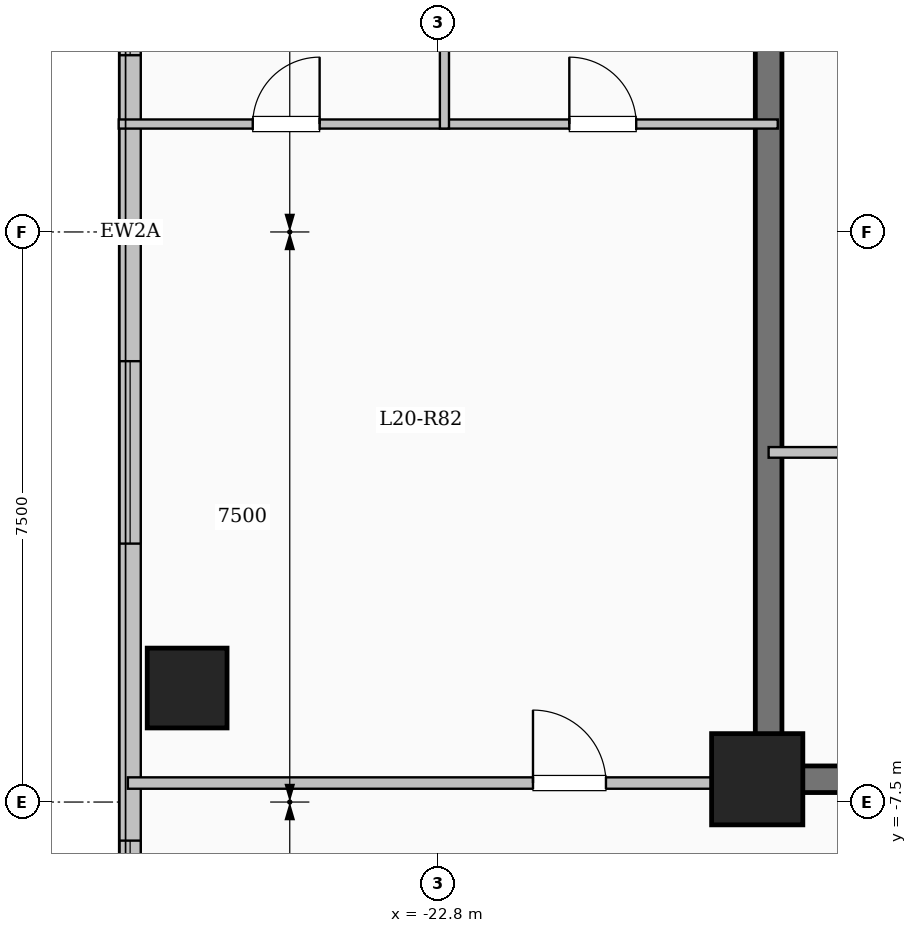
"""IFC4 building model, lengths in metres.
Left out: names, types, materials, properties, quantities, classifications, styles, units other than length and angle.
Written with IfcOpenShell. Run it as: python <this file> out.ifc"""

import sys

from ifc_helpers import new_model, si_unit, direction, frame, frame_2d, origin, origin_2d, place, context, subcontext, project, spatial, rectangle, extrude, element, fill, save


model = new_model("IFC4")
c1 = context("Model", 3, precision=1e-05, world=origin(), true_north=direction((0.0, 1.0)))
c2 = subcontext(c1, "Body", "Model", "MODEL_VIEW")
j1 = project(units=[si_unit("LENGTHUNIT", "METRE"), si_unit("PLANEANGLEUNIT", "RADIAN")], contexts=[c1])
p1 = place(None, origin())
s1 = spatial("IfcSite", under=j1, at=p1, CompositionType="ELEMENT")
p2 = place(p1, origin())
s2 = spatial("IfcBuilding", under=s1, at=p2, CompositionType="ELEMENT")
p3 = place(p2, frame((0.0, 0.0, 78.3)))
s3 = spatial("IfcBuildingStorey", under=s2, at=p3, CompositionType="ELEMENT", Elevation=78.3)
p4 = place(p3, frame((-18.6, -7.2, 0.0), z_axis=(0.0, 0.0, 1.0), x_axis=(1.0, 0.0, 0.0)))
e1 = element("IfcColumn", 1, at=p4, inside=s3, PredefinedType="COLUMN", context=c2, shape_type="SweptSolid", body=[
    extrude(rectangle(XDim=1.2, YDim=1.2, at=origin_2d()), origin(), (0.0, 0.0, 1.0), 3.35),
])
p5 = place(p3, frame((-26.1, -6.0, 0.0), z_axis=(0.0, 0.0, 1.0), x_axis=(1.0, 0.0, 0.0)))
e2 = element("IfcColumn", 2, at=p5, inside=s3, PredefinedType="COLUMN", context=c2, shape_type="SweptSolid", body=[
    extrude(rectangle(XDim=1.05, YDim=1.05, at=origin_2d()), origin(), (0.0, 0.0, 1.0), 3.35),
])
p6 = place(p3, frame((-26.85, -17.85, 0.0), z_axis=(0.0, 0.0, 1.0), x_axis=(0.0, 1.0, 0.0)))
e3 = element("IfcWall", 3, at=p6, inside=s3, PredefinedType="SOLIDWALL", context=c2, shape_type="SweptSolid", body=[
    extrude(rectangle(XDim=35.7, YDim=0.28, at=frame_2d((17.85, 0.0))), origin(), (0.0, 0.0, 1.0), 3.1),
])
p7 = place(p6, frame((2.55, 0.0, 0.9)))
e4 = element("IfcOpeningElement", 4, at=p7, cuts=e3, PredefinedType="OPENING", context=c2, shape_type="SweptSolid", body=[
    extrude(rectangle(XDim=2.4, YDim=1.8, at=frame_2d((1.2, 0.9))), frame((0.0, 0.15, 0.0), z_axis=(0.0, -1.0, 0.0), x_axis=(1.0, 0.0, 0.0)), (0.0, 0.0, 1.0), 0.3),
])
p8 = place(p6, frame((8.343, 0.0, 0.9)))
e5 = element("IfcOpeningElement", 5, at=p8, cuts=e3, PredefinedType="OPENING", context=c2, shape_type="SweptSolid", body=[
    extrude(rectangle(XDim=1.5, YDim=1.65, at=frame_2d((0.75, 0.825))), frame((0.0, 0.15, 0.0), z_axis=(0.0, -1.0, 0.0), x_axis=(1.0, 0.0, 0.0)), (0.0, 0.0, 1.0), 0.3),
])
p9 = place(p6, frame((13.75, 0.0, 0.9)))
e6 = element("IfcOpeningElement", 6, at=p9, cuts=e3, PredefinedType="OPENING", context=c2, shape_type="SweptSolid", body=[
    extrude(rectangle(XDim=2.4, YDim=1.8, at=frame_2d((1.2, 0.9))), frame((0.0, 0.15, 0.0), z_axis=(0.0, -1.0, 0.0), x_axis=(1.0, 0.0, 0.0)), (0.0, 0.0, 1.0), 0.3),
])
p10 = place(p6, frame((20.175, 0.0, 0.9)))
e7 = element("IfcOpeningElement", 7, at=p10, cuts=e3, PredefinedType="OPENING", context=c2, shape_type="SweptSolid", body=[
    extrude(rectangle(XDim=1.8, YDim=1.65, at=frame_2d((0.9, 0.825))), frame((0.0, 0.15, 0.0), z_axis=(0.0, -1.0, 0.0), x_axis=(1.0, 0.0, 0.0)), (0.0, 0.0, 1.0), 0.3),
])
p11 = place(p6, frame((24.725, 0.0, 0.9)))
e8 = element("IfcOpeningElement", 8, at=p11, cuts=e3, PredefinedType="OPENING", context=c2, shape_type="SweptSolid", body=[
    extrude(rectangle(XDim=2.0, YDim=1.7, at=frame_2d((1.0, 0.85))), frame((0.0, 0.15, 0.0), z_axis=(0.0, -1.0, 0.0), x_axis=(1.0, 0.0, 0.0)), (0.0, 0.0, 1.0), 0.3),
])
p12 = place(p6, frame((28.975, 0.0, 0.95)))
e9 = element("IfcOpeningElement", 9, at=p12, cuts=e3, PredefinedType="OPENING", context=c2, shape_type="SweptSolid", body=[
    extrude(rectangle(XDim=1.0, YDim=1.5, at=frame_2d((0.5, 0.75))), frame((0.0, 0.15, 0.0), z_axis=(0.0, -1.0, 0.0), x_axis=(1.0, 0.0, 0.0)), (0.0, 0.0, 1.0), 0.3),
])
p13 = place(p6, frame((32.025, 0.0, 0.9)))
e10 = element("IfcOpeningElement", 10, at=p13, cuts=e3, PredefinedType="OPENING", context=c2, shape_type="SweptSolid", body=[
    extrude(rectangle(XDim=2.0, YDim=1.7, at=frame_2d((1.0, 0.85))), frame((0.0, 0.15, 0.0), z_axis=(0.0, -1.0, 0.0), x_axis=(1.0, 0.0, 0.0)), (0.0, 0.0, 1.0), 0.3),
])
p14 = place(p3, frame((-18.45, -7.375, 0.0), z_axis=(0.0, 0.0, 1.0), x_axis=(0.0, 1.0, 0.0)))
e11 = element("IfcWall", 11, at=p14, inside=s3, PredefinedType="SHEAR", context=c2, shape_type="SweptSolid", body=[
    extrude(rectangle(XDim=14.05, YDim=0.35, at=frame_2d((7.025, 0.0))), origin(), (0.0, 0.0, 1.0), 3.35),
])
p15 = place(p3, frame((-18.625, -7.2, 0.0), z_axis=(0.0, 0.0, 1.0), x_axis=(1.0, 0.0, 0.0)))
e12 = element("IfcWall", 12, at=p15, inside=s3, PredefinedType="SHEAR", context=c2, shape_type="SweptSolid", body=[
    extrude(rectangle(XDim=8.55, YDim=0.35, at=frame_2d((4.275, 0.0))), origin(), (0.0, 0.0, 1.0), 3.35),
])
p16 = place(p3, frame((-18.45, -2.9, 0.0), z_axis=(0.0, 0.0, 1.0), x_axis=(1.0, 0.0, 0.0)))
e13 = element("IfcWall", 13, at=p16, inside=s3, PredefinedType="PARTITIONING", context=c2, shape_type="SweptSolid", body=[
    extrude(rectangle(XDim=3.05, YDim=0.14, at=frame_2d((1.525, 0.0))), origin(), (0.0, 0.0, 1.0), 3.1),
])
p17 = place(p16, frame((1.05, 0.0, 0.0)))
e14 = element("IfcOpeningElement", 14, at=p17, cuts=e13, PredefinedType="OPENING", context=c2, shape_type="SweptSolid", body=[
    extrude(rectangle(XDim=0.9, YDim=2.08, at=frame_2d((0.45, 1.04))), frame((0.0, 0.08, 0.0), z_axis=(0.0, -1.0, 0.0), x_axis=(1.0, 0.0, 0.0)), (0.0, 0.0, 1.0), 0.16),
])
p18 = place(p3, frame((-26.88, -7.25, 0.0), z_axis=(0.0, 0.0, 1.0), x_axis=(1.0, 0.0, 0.0)))
e15 = element("IfcWall", 15, at=p18, inside=s3, PredefinedType="PARTITIONING", context=c2, shape_type="SweptSolid", body=[
    extrude(rectangle(XDim=8.43, YDim=0.15, at=frame_2d((4.215, 0.0))), origin(), (0.0, 0.0, 1.0), 3.1),
])
p19 = place(p18, frame((5.33, 0.0, 0.0)))
e16 = element("IfcOpeningElement", 16, at=p19, cuts=e15, PredefinedType="OPENING", context=c2, shape_type="SweptSolid", body=[
    extrude(rectangle(XDim=0.96, YDim=2.15, at=frame_2d((0.48, 1.075))), frame((0.0, 0.085, 0.0), z_axis=(0.0, -1.0, 0.0), x_axis=(1.0, 0.0, 0.0)), (0.0, 0.0, 1.0), 0.17),
])
p20 = place(p3, frame((-27.0, 1.42, 0.0), z_axis=(0.0, 0.0, 1.0), x_axis=(1.0, 0.0, 0.0)))
e17 = element("IfcWall", 17, at=p20, inside=s3, PredefinedType="PARTITIONING", context=c2, shape_type="SweptSolid", body=[
    extrude(rectangle(XDim=8.67, YDim=0.12, at=frame_2d((4.335, 0.0))), origin(), (0.0, 0.0, 1.0), 3.1),
])
p21 = place(p20, frame((1.763, 0.0, 0.0)))
e18 = element("IfcOpeningElement", 18, at=p21, cuts=e17, PredefinedType="OPENING", context=c2, shape_type="SweptSolid", body=[
    extrude(rectangle(XDim=0.88, YDim=2.1, at=frame_2d((0.44, 1.05))), frame((0.0, 0.07, 0.0), z_axis=(0.0, -1.0, 0.0), x_axis=(1.0, 0.0, 0.0)), (0.0, 0.0, 1.0), 0.14),
])
p22 = place(p20, frame((5.928, 0.0, 0.0)))
e19 = element("IfcOpeningElement", 19, at=p22, cuts=e17, PredefinedType="OPENING", context=c2, shape_type="SweptSolid", body=[
    extrude(rectangle(XDim=0.88, YDim=2.1, at=frame_2d((0.44, 1.05))), frame((0.0, 0.07, 0.0), z_axis=(0.0, -1.0, 0.0), x_axis=(1.0, 0.0, 0.0)), (0.0, 0.0, 1.0), 0.14),
])
p23 = place(p3, frame((-22.715, 1.36, 0.0), z_axis=(0.0, 0.0, 1.0), x_axis=(0.0, 1.0, 0.0)))
e20 = element("IfcWall", 20, at=p23, inside=s3, PredefinedType="PARTITIONING", context=c2, shape_type="SweptSolid", body=[
    extrude(rectangle(XDim=3.58, YDim=0.12, at=frame_2d((1.79, 0.0))), origin(), (0.0, 0.0, 1.0), 3.1),
])
p24 = place(p8, origin())
e21 = element("IfcWindow", 21, at=p24, inside=s3, PartitioningType="SINGLE_PANEL", PredefinedType="WINDOW", context=c2, shape_type="SweptSolid", body=[
    extrude(rectangle(XDim=1.5, YDim=1.65, at=frame_2d((0.75, 0.825))), frame((0.0, 0.03, 0.0), z_axis=(0.0, -1.0, 0.0), x_axis=(1.0, 0.0, 0.0)), (0.0, 0.0, 1.0), 0.06),
])
fill(e5, e21)
p25 = place(p9, origin())
e22 = element("IfcWindow", 22, at=p25, inside=s3, PartitioningType="SINGLE_PANEL", PredefinedType="WINDOW", context=c2, shape_type="SweptSolid", body=[
    extrude(rectangle(XDim=2.4, YDim=1.8, at=frame_2d((1.2, 0.9))), frame((0.0, 0.03, 0.0), z_axis=(0.0, -1.0, 0.0), x_axis=(1.0, 0.0, 0.0)), (0.0, 0.0, 1.0), 0.06),
])
fill(e6, e22)
p26 = place(p10, origin())
e23 = element("IfcWindow", 23, at=p26, inside=s3, PartitioningType="SINGLE_PANEL", PredefinedType="WINDOW", context=c2, shape_type="SweptSolid", body=[
    extrude(rectangle(XDim=1.8, YDim=1.65, at=frame_2d((0.9, 0.825))), frame((0.0, 0.03, 0.0), z_axis=(0.0, -1.0, 0.0), x_axis=(1.0, 0.0, 0.0)), (0.0, 0.0, 1.0), 0.06),
])
fill(e7, e23)
p27 = place(p19, origin())
e24 = element("IfcDoor", 24, at=p27, inside=s3, OperationType="SINGLE_SWING_LEFT", PredefinedType="DOOR", context=c2, shape_type="SweptSolid", body=[
    extrude(rectangle(XDim=0.96, YDim=2.15, at=frame_2d((0.48, 1.075))), frame((0.0, 0.025, 0.0), z_axis=(0.0, -1.0, 0.0), x_axis=(1.0, 0.0, 0.0)), (0.0, 0.0, 1.0), 0.05),
])
fill(e16, e24)
p28 = place(p21, origin())
e25 = element("IfcDoor", 25, at=p28, inside=s3, OperationType="SINGLE_SWING_RIGHT", PredefinedType="DOOR", context=c2, shape_type="SweptSolid", body=[
    extrude(rectangle(XDim=0.88, YDim=2.1, at=frame_2d((0.44, 1.05))), frame((0.0, 0.025, 0.0), z_axis=(0.0, -1.0, 0.0), x_axis=(1.0, 0.0, 0.0)), (0.0, 0.0, 1.0), 0.05),
])
fill(e18, e25)
p29 = place(p22, origin())
e26 = element("IfcDoor", 26, at=p29, inside=s3, OperationType="SINGLE_SWING_LEFT", PredefinedType="DOOR", context=c2, shape_type="SweptSolid", body=[
    extrude(rectangle(XDim=0.88, YDim=2.1, at=frame_2d((0.44, 1.05))), frame((0.0, 0.025, 0.0), z_axis=(0.0, -1.0, 0.0), x_axis=(1.0, 0.0, 0.0)), (0.0, 0.0, 1.0), 0.05),
])
fill(e19, e26)
save(model, sys.argv[1])
